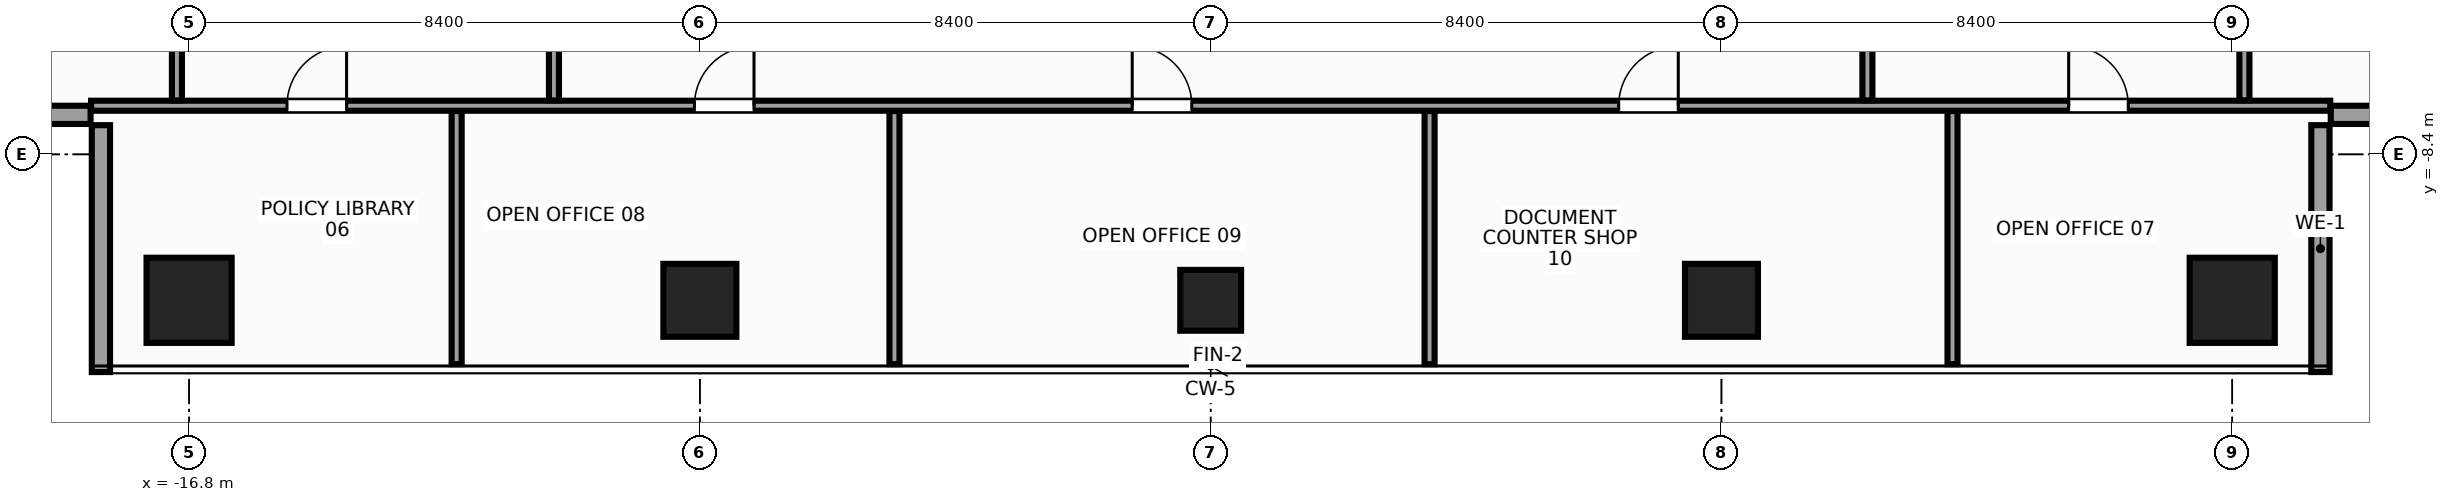
"""IFC4 building model, lengths in metres.
Left out: names, types, materials, properties, quantities, classifications, styles, units other than length and angle.
Written with IfcOpenShell. Run it as: python <this file> out.ifc"""

import sys

from ifc_helpers import new_model, si_unit, direction, frame, frame_2d, origin, origin_2d, place, context, subcontext, project, spatial, rectangle, extrude, source, transform, mapped, element, fill, save


model = new_model("IFC4")
c1 = context("Model", 3, precision=1e-05, world=origin(), true_north=direction((0.0, 1.0)))
c2 = subcontext(c1, "Body", "Model", "MODEL_VIEW")
j1 = project(units=[si_unit("LENGTHUNIT", "METRE"), si_unit("PLANEANGLEUNIT", "RADIAN")], contexts=[c1])
p1 = place(None, origin())
s1 = spatial("IfcSite", under=j1, at=p1, CompositionType="ELEMENT")
p2 = place(p1, origin())
s2 = spatial("IfcBuilding", under=s1, at=p2, CompositionType="ELEMENT")
p3 = place(p2, frame((0.0, 0.0, 261.2)))
s3 = spatial("IfcBuildingStorey", under=s2, at=p3, CompositionType="ELEMENT", Elevation=261.2)
m1 = source(origin(), c2, "Body", "SweptSolid", [
    extrude(rectangle(XDim=1.4, YDim=1.4, at=origin_2d()), origin(), (0.0, 0.0, 1.0), 3.6),
])
for number, where, z_axis, x_axis in (
    (1, (-16.8, -10.8, 0.0), (0.0, 0.0, 1.0), (1.0, 0.0, 0.0)),
    (2, (16.8, -10.8, 0.0), (0.0, 0.0, 1.0), (1.0, 0.0, 0.0)),
):
    element("IfcColumn", number, at=place(p3, frame(where, z_axis=z_axis, x_axis=x_axis)), inside=s3, PredefinedType="COLUMN", context=c2, shape_type="MappedRepresentation", body=[
        mapped(m1, transform((0.0, 0.0, 0.0), x_axis=(1.0, 0.0, 0.0), y_axis=(0.0, 1.0, 0.0), z_axis=(0.0, 0.0, 1.0), scale=1.0)),
    ])
m2 = source(origin(), c2, "Body", "SweptSolid", [
    extrude(rectangle(XDim=1.2, YDim=1.2, at=origin_2d()), origin(), (0.0, 0.0, 1.0), 3.6),
])
for number, where, z_axis, x_axis in (
    (3, (-8.4, -10.8, 0.0), (0.0, 0.0, 1.0), (1.0, 0.0, 0.0)),
    (4, (8.4, -10.8, 0.0), (0.0, 0.0, 1.0), (1.0, 0.0, 0.0)),
):
    element("IfcColumn", number, at=place(p3, frame(where, z_axis=z_axis, x_axis=x_axis)), inside=s3, PredefinedType="COLUMN", context=c2, shape_type="MappedRepresentation", body=[
        mapped(m2, transform((0.0, 0.0, 0.0), x_axis=(1.0, 0.0, 0.0), y_axis=(0.0, 1.0, 0.0), z_axis=(0.0, 0.0, 1.0), scale=1.0)),
    ])
m3 = source(origin(), c2, "Body", "SweptSolid", [
    extrude(rectangle(XDim=1.0, YDim=1.0, at=origin_2d()), origin(), (0.0, 0.0, 1.0), 3.6),
])
p4 = place(p3, frame((0.0, -10.8, 0.0), z_axis=(0.0, 0.0, 1.0), x_axis=(1.0, 0.0, 0.0)))
e5 = element("IfcColumn", 5, at=p4, inside=s3, PredefinedType="COLUMN", context=c2, shape_type="MappedRepresentation", body=[
    mapped(m3, transform((0.0, 0.0, 0.0), x_axis=(1.0, 0.0, 0.0), y_axis=(0.0, 1.0, 0.0), z_axis=(0.0, 0.0, 1.0), scale=1.0)),
])
m4 = source(origin(), c2, "Body", "SweptSolid", [
    extrude(rectangle(XDim=4.06, YDim=0.3, at=frame_2d((2.03, 0.0))), origin(), (0.0, 0.0, 1.0), 2.75),
])
for number, where, z_axis, x_axis in (
    (6, (18.25, -11.98, 0.0), (0.0, 0.0, 1.0), (0.0, 1.0, 0.0)),
    (7, (18.42, -7.75, 0.0), (0.0, 0.0, 1.0), (1.0, 0.0, 0.0)),
    (8, (-22.48, -7.75, 0.0), (0.0, 0.0, 1.0), (1.0, 0.0, 0.0)),
    (9, (-18.25, -7.92, 0.0), (0.0, 0.0, 1.0), (0.0, -1.0, 0.0)),
):
    element("IfcWall", number, at=place(p3, frame(where, z_axis=z_axis, x_axis=x_axis)), inside=s3, PredefinedType="STANDARD", context=c2, shape_type="MappedRepresentation", body=[
        mapped(m4, transform((0.0, 0.0, 0.0), x_axis=(1.0, 0.0, 0.0), y_axis=(0.0, 1.0, 0.0), z_axis=(0.0, 0.0, 1.0), scale=1.0)),
    ])
m5 = source(origin(), c2, "Body", "SweptSolid", [
    extrude(rectangle(XDim=36.824, YDim=0.165, at=frame_2d((18.412, 0.0))), origin(), (0.0, 0.0, 1.0), 2.755),
])
p5 = place(p3, frame((-18.412, -7.6, 0.0), z_axis=(0.0, 0.0, 1.0), x_axis=(1.0, 0.0, 0.0)))
e10 = element("IfcWall", 10, at=p5, inside=s3, PredefinedType="PARTITIONING", context=c2, shape_type="MappedRepresentation", body=[
    mapped(m5, transform((0.0, 0.0, 0.0), x_axis=(1.0, 0.0, 0.0), y_axis=(0.0, 1.0, 0.0), z_axis=(0.0, 0.0, 1.0), scale=1.0)),
])
p6 = place(p5, frame((3.222, 0.0, 0.0)))
e11 = element("IfcOpeningElement", 11, at=p6, cuts=e10, PredefinedType="OPENING", context=c2, shape_type="SweptSolid", body=[
    extrude(rectangle(XDim=0.98, YDim=2.15, at=frame_2d((0.49, 1.075))), frame((0.0, 0.094, 0.0), z_axis=(0.0, -1.0, 0.0), x_axis=(1.0, 0.0, 0.0)), (0.0, 0.0, 1.0), 0.189),
])
p7 = place(p5, frame((32.522, 0.0, 0.0)))
e12 = element("IfcOpeningElement", 12, at=p7, cuts=e10, PredefinedType="OPENING", context=c2, shape_type="SweptSolid", body=[
    extrude(rectangle(XDim=0.98, YDim=2.15, at=frame_2d((0.49, 1.075))), frame((0.0, 0.094, 0.0), z_axis=(0.0, -1.0, 0.0), x_axis=(1.0, 0.0, 0.0)), (0.0, 0.0, 1.0), 0.189),
])
p8 = place(p5, frame((9.922, 0.0, 0.0)))
e13 = element("IfcOpeningElement", 13, at=p8, cuts=e10, PredefinedType="OPENING", context=c2, shape_type="SweptSolid", body=[
    extrude(rectangle(XDim=0.98, YDim=2.15, at=frame_2d((0.49, 1.075))), frame((0.0, 0.094, 0.0), z_axis=(0.0, -1.0, 0.0), x_axis=(1.0, 0.0, 0.0)), (0.0, 0.0, 1.0), 0.189),
])
p9 = place(p5, frame((17.122, 0.0, 0.0)))
e14 = element("IfcOpeningElement", 14, at=p9, cuts=e10, PredefinedType="OPENING", context=c2, shape_type="SweptSolid", body=[
    extrude(rectangle(XDim=0.98, YDim=2.15, at=frame_2d((0.49, 1.075))), frame((0.0, 0.094, 0.0), z_axis=(0.0, -1.0, 0.0), x_axis=(1.0, 0.0, 0.0)), (0.0, 0.0, 1.0), 0.189),
])
p10 = place(p5, frame((25.122, 0.0, 0.0)))
e15 = element("IfcOpeningElement", 15, at=p10, cuts=e10, PredefinedType="OPENING", context=c2, shape_type="SweptSolid", body=[
    extrude(rectangle(XDim=0.98, YDim=2.15, at=frame_2d((0.49, 1.075))), frame((0.0, 0.094, 0.0), z_axis=(0.0, -1.0, 0.0), x_axis=(1.0, 0.0, 0.0)), (0.0, 0.0, 1.0), 0.189),
])
m6 = source(origin(), c2, "Body", "SweptSolid", [
    extrude(rectangle(XDim=6.802, YDim=0.165, at=frame_2d((3.401, 0.0))), origin(), (0.0, 0.0, 1.0), 2.755),
])
p11 = place(p3, frame((-17.0, -7.512, 0.0), z_axis=(0.0, 0.0, 1.0), x_axis=(0.0, 1.0, 0.0)))
e16 = element("IfcWall", 16, at=p11, inside=s3, PredefinedType="PARTITIONING", context=c2, shape_type="MappedRepresentation", body=[
    mapped(m6, transform((0.0, 0.0, 0.0), x_axis=(1.0, 0.0, 0.0), y_axis=(0.0, 1.0, 0.0), z_axis=(0.0, 0.0, 1.0), scale=1.0)),
])
m7 = source(origin(), c2, "Body", "SweptSolid", [
    extrude(rectangle(XDim=15.142, YDim=0.165, at=frame_2d((7.571, 0.0))), origin(), (0.0, 0.0, 1.0), 2.655),
])
for number, where, z_axis, x_axis in (
    (17, (-10.8, -7.512, 0.0), (0.0, 0.0, 1.0), (0.0, 1.0, 0.0)),
    (18, (10.8, -7.512, 0.0), (0.0, 0.0, 1.0), (0.0, 1.0, 0.0)),
):
    element("IfcWall", number, at=place(p3, frame(where, z_axis=z_axis, x_axis=x_axis)), inside=s3, PredefinedType="PARTITIONING", context=c2, shape_type="MappedRepresentation", body=[
        mapped(m7, transform((0.0, 0.0, 0.0), x_axis=(1.0, 0.0, 0.0), y_axis=(0.0, 1.0, 0.0), z_axis=(0.0, 0.0, 1.0), scale=1.0)),
    ])
p12 = place(p3, frame((17.0, -7.512, 0.0), z_axis=(0.0, 0.0, 1.0), x_axis=(0.0, 1.0, 0.0)))
e19 = element("IfcWall", 19, at=p12, inside=s3, PredefinedType="PARTITIONING", context=c2, shape_type="MappedRepresentation", body=[
    mapped(m6, transform((0.0, 0.0, 0.0), x_axis=(1.0, 0.0, 0.0), y_axis=(0.0, 1.0, 0.0), z_axis=(0.0, 0.0, 1.0), scale=1.0)),
])
m8 = source(origin(), c2, "Body", "SweptSolid", [
    extrude(rectangle(XDim=4.163, YDim=0.165, at=frame_2d((2.081, 0.0))), origin(), (0.0, 0.0, 1.0), 2.905),
])
for number, where, z_axis, x_axis in (
    (20, (-12.4, -11.85, 0.0), (0.0, 0.0, 1.0), (0.0, 1.0, 0.0)),
    (21, (-5.2, -11.85, 0.0), (0.0, 0.0, 1.0), (0.0, 1.0, 0.0)),
    (22, (3.6, -11.85, 0.0), (0.0, 0.0, 1.0), (0.0, 1.0, 0.0)),
    (23, (12.2, -11.85, 0.0), (0.0, 0.0, 1.0), (0.0, 1.0, 0.0)),
):
    element("IfcWall", number, at=place(p3, frame(where, z_axis=z_axis, x_axis=x_axis)), inside=s3, PredefinedType="PARTITIONING", context=c2, shape_type="MappedRepresentation", body=[
        mapped(m8, transform((0.0, 0.0, 0.0), x_axis=(1.0, 0.0, 0.0), y_axis=(0.0, 1.0, 0.0), z_axis=(0.0, 0.0, 1.0), scale=1.0)),
    ])
m9 = source(origin(), c2, "Body", "SweptSolid", [
    extrude(rectangle(XDim=0.98, YDim=2.15, at=frame_2d((0.49, 1.075))), frame((0.0, 0.025, 0.0), z_axis=(0.0, -1.0, 0.0), x_axis=(1.0, 0.0, 0.0)), (0.0, 0.0, 1.0), 0.05),
])
p13 = place(p6, origin())
e24 = element("IfcDoor", 24, at=p13, inside=s3, OperationType="SINGLE_SWING_RIGHT", PredefinedType="DOOR", context=c2, shape_type="MappedRepresentation", body=[
    mapped(m9, transform((0.0, 0.0, 0.0), x_axis=(1.0, 0.0, 0.0), y_axis=(0.0, 1.0, 0.0), z_axis=(0.0, 0.0, 1.0), scale=1.0)),
])
fill(e11, e24)
p14 = place(p7, origin())
e25 = element("IfcDoor", 25, at=p14, inside=s3, OperationType="SINGLE_SWING_LEFT", PredefinedType="DOOR", context=c2, shape_type="MappedRepresentation", body=[
    mapped(m9, transform((0.0, 0.0, 0.0), x_axis=(1.0, 0.0, 0.0), y_axis=(0.0, 1.0, 0.0), z_axis=(0.0, 0.0, 1.0), scale=1.0)),
])
fill(e12, e25)
p15 = place(p8, origin())
e26 = element("IfcDoor", 26, at=p15, inside=s3, OperationType="SINGLE_SWING_RIGHT", PredefinedType="DOOR", context=c2, shape_type="MappedRepresentation", body=[
    mapped(m9, transform((0.0, 0.0, 0.0), x_axis=(1.0, 0.0, 0.0), y_axis=(0.0, 1.0, 0.0), z_axis=(0.0, 0.0, 1.0), scale=1.0)),
])
fill(e13, e26)
p16 = place(p9, origin())
e27 = element("IfcDoor", 27, at=p16, inside=s3, OperationType="SINGLE_SWING_LEFT", PredefinedType="DOOR", context=c2, shape_type="MappedRepresentation", body=[
    mapped(m9, transform((0.0, 0.0, 0.0), x_axis=(1.0, 0.0, 0.0), y_axis=(0.0, 1.0, 0.0), z_axis=(0.0, 0.0, 1.0), scale=1.0)),
])
fill(e14, e27)
p17 = place(p10, origin())
e28 = element("IfcDoor", 28, at=p17, inside=s3, OperationType="SINGLE_SWING_RIGHT", PredefinedType="DOOR", context=c2, shape_type="MappedRepresentation", body=[
    mapped(m9, transform((0.0, 0.0, 0.0), x_axis=(1.0, 0.0, 0.0), y_axis=(0.0, 1.0, 0.0), z_axis=(0.0, 0.0, 1.0), scale=1.0)),
])
fill(e15, e28)
save(model, sys.argv[1])
